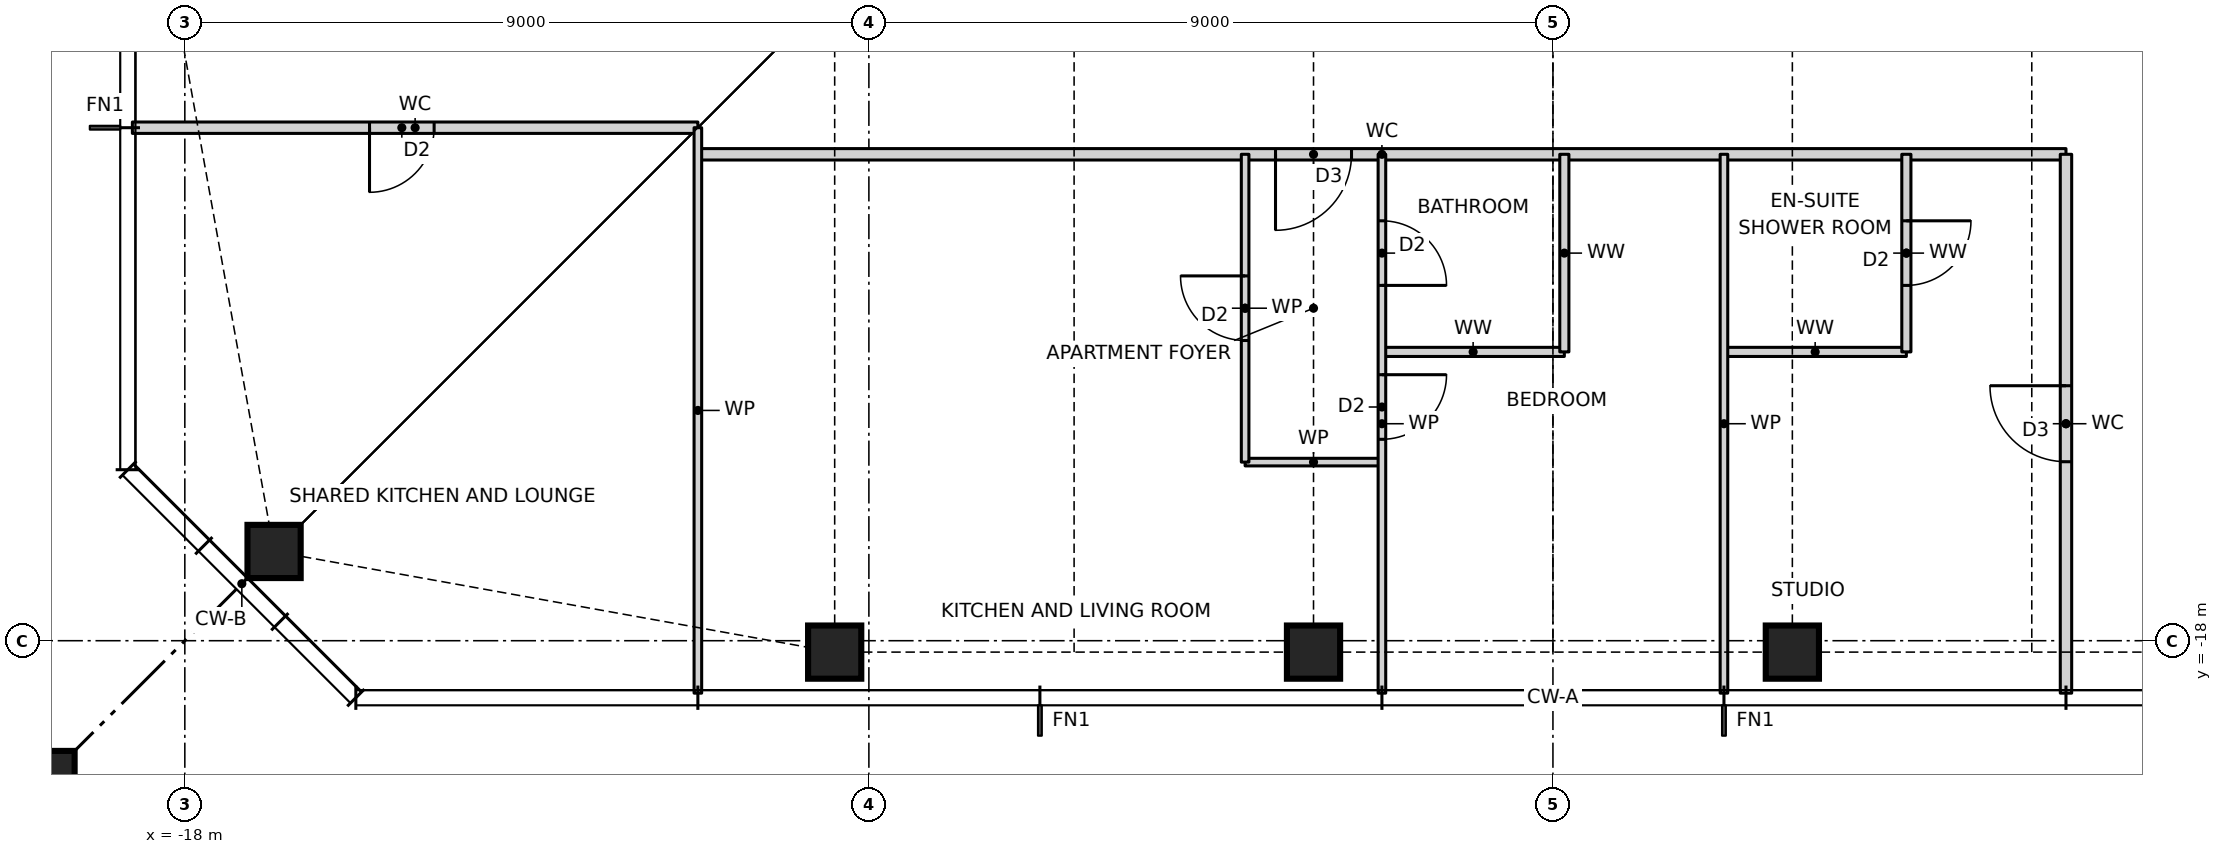
"""IFC4 building model, lengths in metres.
Left out: names, types, materials, properties, quantities, classifications, styles, units other than length and angle.
Written with IfcOpenShell. Run it as: python <this file> out.ifc"""

import sys

from ifc_helpers import new_model, si_unit, direction, frame, frame_2d, origin, origin_2d, place, context, subcontext, project, spatial, rectangle, hollow_rectangle, i_section, extrude, element, fill, save


model = new_model("IFC4")
c1 = context("Model", 3, precision=1e-05, world=origin(), true_north=direction((0.0, 1.0)))
c2 = subcontext(c1, "Body", "Model", "MODEL_VIEW")
j1 = project(units=[si_unit("LENGTHUNIT", "METRE"), si_unit("PLANEANGLEUNIT", "RADIAN")], contexts=[c1])
p1 = place(None, origin())
s1 = spatial("IfcSite", under=j1, at=p1, CompositionType="ELEMENT")
p2 = place(p1, origin())
s2 = spatial("IfcBuilding", under=s1, at=p2, CompositionType="ELEMENT")
p3 = place(p2, frame((0.0, 0.0, 170.5)))
s3 = spatial("IfcBuildingStorey", under=s2, at=p3, CompositionType="ELEMENT", Elevation=170.5)
for number, where, z_axis, x_axis in (
    (1, (-16.826, -16.826, 0.0), (0.0, 0.0, 1.0), (1.0, 0.0, 0.0)),
    (2, (-9.45, -18.15, 0.0), (0.0, 0.0, 1.0), (1.0, 0.0, 0.0)),
    (3, (-3.15, -18.15, 0.0), (0.0, 0.0, 1.0), (1.0, 0.0, 0.0)),
    (4, (3.15, -18.15, 0.0), (0.0, 0.0, 1.0), (1.0, 0.0, 0.0)),
):
    element("IfcColumn", number, at=place(p3, frame(where, z_axis=z_axis, x_axis=x_axis)), inside=s3, PredefinedType="COLUMN", context=c2, shape_type="SweptSolid", body=[
        extrude(hollow_rectangle(XDim=0.7, YDim=0.7, WallThickness=0.06, at=origin_2d()), origin(), (0.0, 0.0, 1.0), 3.5),
    ])
p4 = place(p3, frame((-21.65, -21.65, 0.0), z_axis=(0.0, 0.0, 1.0), x_axis=(1.0, 0.0, 0.0)))
e5 = element("IfcColumn", 5, at=p4, inside=s3, PredefinedType="COLUMN", context=c2, shape_type="SweptSolid", body=[
    extrude(rectangle(XDim=4.4, YDim=4.4, at=origin_2d()), origin(), (0.0, 0.0, 1.0), 3.5),
    extrude(i_section(OverallWidth=0.478, OverallDepth=0.599, WebThickness=0.1, FlangeThickness=0.14, at=origin_2d()), origin(), (0.0, 0.0, 1.0), 3.5),
])
p5 = place(p3, frame((-4.05, -15.65, 0.0), z_axis=(0.0, 0.0, 1.0), x_axis=(1.0, 0.0, 0.0)))
e6 = element("IfcWall", 6, at=p5, inside=s3, PredefinedType="PARTITIONING", context=c2, shape_type="SweptSolid", body=[
    extrude(rectangle(XDim=1.8, YDim=0.1, at=frame_2d((0.9, 0.0))), origin(), (0.0, 0.0, 1.0), 3.27),
])
for number, where, z_axis, x_axis in (
    (7, (-2.25, -14.2, 0.0), (0.0, 0.0, 1.0), (1.0, 0.0, 0.0)),
    (8, (2.25, -14.2, 0.0), (0.0, 0.0, 1.0), (1.0, 0.0, 0.0)),
):
    element("IfcWall", number, at=place(p3, frame(where, z_axis=z_axis, x_axis=x_axis)), inside=s3, PredefinedType="PARTITIONING", context=c2, shape_type="SweptSolid", body=[
        extrude(rectangle(XDim=2.4, YDim=0.12, at=frame_2d((1.2, 0.0))), origin(), (0.0, 0.0, 1.0), 3.27),
    ])
p6 = place(p3, frame((-11.25, -11.6, 0.0), z_axis=(0.0, 0.0, 1.0), x_axis=(1.0, 0.0, 0.0)))
e9 = element("IfcWall", 9, at=p6, inside=s3, PredefinedType="PARTITIONING", context=c2, shape_type="SweptSolid", body=[
    extrude(rectangle(XDim=18.0, YDim=0.15, at=frame_2d((9.0, 0.0))), origin(), (0.0, 0.0, 1.0), 3.27),
])
p7 = place(p6, frame((7.6, 0.0, 0.0)))
e10 = element("IfcOpeningElement", 10, at=p7, cuts=e9, PredefinedType="OPENING", context=c2, shape_type="SweptSolid", body=[
    extrude(rectangle(XDim=1.0, YDim=2.1, at=frame_2d((0.5, 1.05))), frame((0.0, 0.085, 0.0), z_axis=(0.0, -1.0, 0.0), x_axis=(1.0, 0.0, 0.0)), (0.0, 0.0, 1.0), 0.17),
])
p8 = place(p3, frame((-18.69, -11.25, 0.0), z_axis=(0.0, 0.0, 1.0), x_axis=(1.0, 0.0, 0.0)))
e11 = element("IfcWall", 11, at=p8, inside=s3, PredefinedType="PARTITIONING", context=c2, shape_type="SweptSolid", body=[
    extrude(rectangle(XDim=7.44, YDim=0.15, at=frame_2d((3.72, 0.0))), origin(), (0.0, 0.0, 1.0), 3.27),
])
p9 = place(p8, frame((3.12, 0.0, 0.0)))
e12 = element("IfcOpeningElement", 12, at=p9, cuts=e11, PredefinedType="OPENING", context=c2, shape_type="SweptSolid", body=[
    extrude(rectangle(XDim=0.85, YDim=2.1, at=frame_2d((0.425, 1.05))), frame((0.0, 0.085, 0.0), z_axis=(0.0, -1.0, 0.0), x_axis=(1.0, 0.0, 0.0)), (0.0, 0.0, 1.0), 0.17),
])
p10 = place(p3, frame((6.75, -18.69, 0.0), z_axis=(0.0, 0.0, 1.0), x_axis=(0.0, 1.0, 0.0)))
e13 = element("IfcWall", 13, at=p10, inside=s3, PredefinedType="PARTITIONING", context=c2, shape_type="SweptSolid", body=[
    extrude(rectangle(XDim=7.09, YDim=0.15, at=frame_2d((3.545, 0.0))), origin(), (0.0, 0.0, 1.0), 3.27),
])
p11 = place(p10, frame((3.045, 0.0, 0.0)))
e14 = element("IfcOpeningElement", 14, at=p11, cuts=e13, PredefinedType="OPENING", context=c2, shape_type="SweptSolid", body=[
    extrude(rectangle(XDim=1.0, YDim=2.1, at=frame_2d((0.5, 1.05))), frame((0.0, 0.085, 0.0), z_axis=(0.0, -1.0, 0.0), x_axis=(1.0, 0.0, 0.0)), (0.0, 0.0, 1.0), 0.17),
])
p12 = place(p3, frame((4.65, -14.2, 0.0), z_axis=(0.0, 0.0, 1.0), x_axis=(0.0, 1.0, 0.0)))
e15 = element("IfcWall", 15, at=p12, inside=s3, PredefinedType="PARTITIONING", context=c2, shape_type="SweptSolid", body=[
    extrude(rectangle(XDim=2.6, YDim=0.12, at=frame_2d((1.3, 0.0))), origin(), (0.0, 0.0, 1.0), 3.27),
])
p13 = place(p12, frame((0.875, 0.0, 0.0)))
e16 = element("IfcOpeningElement", 16, at=p13, cuts=e15, PredefinedType="OPENING", context=c2, shape_type="SweptSolid", body=[
    extrude(rectangle(XDim=0.85, YDim=2.1, at=frame_2d((0.425, 1.05))), frame((0.0, 0.07, 0.0), z_axis=(0.0, -1.0, 0.0), x_axis=(1.0, 0.0, 0.0)), (0.0, 0.0, 1.0), 0.14),
])
p14 = place(p3, frame((2.25, -18.69, 0.0), z_axis=(0.0, 0.0, 1.0), x_axis=(0.0, 1.0, 0.0)))
e17 = element("IfcWall", 17, at=p14, inside=s3, PredefinedType="PARTITIONING", context=c2, shape_type="SweptSolid", body=[
    extrude(rectangle(XDim=7.09, YDim=0.1, at=frame_2d((3.545, 0.0))), origin(), (0.0, 0.0, 1.0), 3.27),
])
p15 = place(p3, frame((0.15, -14.2, 0.0), z_axis=(0.0, 0.0, 1.0), x_axis=(0.0, 1.0, 0.0)))
e18 = element("IfcWall", 18, at=p15, inside=s3, PredefinedType="PARTITIONING", context=c2, shape_type="SweptSolid", body=[
    extrude(rectangle(XDim=2.6, YDim=0.12, at=frame_2d((1.3, 0.0))), origin(), (0.0, 0.0, 1.0), 3.27),
])
p16 = place(p3, frame((-2.25, -18.69, 0.0), z_axis=(0.0, 0.0, 1.0), x_axis=(0.0, 1.0, 0.0)))
e19 = element("IfcWall", 19, at=p16, inside=s3, PredefinedType="PARTITIONING", context=c2, shape_type="SweptSolid", body=[
    extrude(rectangle(XDim=7.09, YDim=0.1, at=frame_2d((3.545, 0.0))), origin(), (0.0, 0.0, 1.0), 3.27),
])
p17 = place(p16, frame((3.34, 0.0, 0.0)))
e20 = element("IfcOpeningElement", 20, at=p17, cuts=e19, PredefinedType="OPENING", context=c2, shape_type="SweptSolid", body=[
    extrude(rectangle(XDim=0.85, YDim=2.1, at=frame_2d((0.425, 1.05))), frame((0.0, 0.06, 0.0), z_axis=(0.0, -1.0, 0.0), x_axis=(1.0, 0.0, 0.0)), (0.0, 0.0, 1.0), 0.12),
])
p18 = place(p16, frame((5.365, 0.0, 0.0)))
e21 = element("IfcOpeningElement", 21, at=p18, cuts=e19, PredefinedType="OPENING", context=c2, shape_type="SweptSolid", body=[
    extrude(rectangle(XDim=0.85, YDim=2.1, at=frame_2d((0.425, 1.05))), frame((0.0, 0.06, 0.0), z_axis=(0.0, -1.0, 0.0), x_axis=(1.0, 0.0, 0.0)), (0.0, 0.0, 1.0), 0.12),
])
p19 = place(p3, frame((-4.05, -15.65, 0.0), z_axis=(0.0, 0.0, 1.0), x_axis=(0.0, 1.0, 0.0)))
e22 = element("IfcWall", 22, at=p19, inside=s3, PredefinedType="PARTITIONING", context=c2, shape_type="SweptSolid", body=[
    extrude(rectangle(XDim=4.05, YDim=0.1, at=frame_2d((2.025, 0.0))), origin(), (0.0, 0.0, 1.0), 3.27),
])
p20 = place(p19, frame((1.6, 0.0, 0.0)))
e23 = element("IfcOpeningElement", 23, at=p20, cuts=e22, PredefinedType="OPENING", context=c2, shape_type="SweptSolid", body=[
    extrude(rectangle(XDim=0.85, YDim=2.1, at=frame_2d((0.425, 1.05))), frame((0.0, 0.06, 0.0), z_axis=(0.0, -1.0, 0.0), x_axis=(1.0, 0.0, 0.0)), (0.0, 0.0, 1.0), 0.12),
])
p21 = place(p3, frame((-11.25, -18.69, 0.0), z_axis=(0.0, 0.0, 1.0), x_axis=(0.0, 1.0, 0.0)))
e24 = element("IfcWall", 24, at=p21, inside=s3, PredefinedType="PARTITIONING", context=c2, shape_type="SweptSolid", body=[
    extrude(rectangle(XDim=7.44, YDim=0.1, at=frame_2d((3.72, 0.0))), origin(), (0.0, 0.0, 1.0), 3.27),
])
p22 = place(p7, frame((1.0, 0.0, 0.0), z_axis=(0.0, 0.0, 1.0), x_axis=(-1.0, 0.0, 0.0)))
e25 = element("IfcDoor", 25, at=p22, inside=s3, OperationType="SINGLE_SWING_RIGHT", PredefinedType="DOOR", context=c2, shape_type="SweptSolid", body=[
    extrude(rectangle(XDim=1.0, YDim=2.1, at=frame_2d((0.5, 1.05))), frame((0.0, 0.025, 0.0), z_axis=(0.0, -1.0, 0.0), x_axis=(1.0, 0.0, 0.0)), (0.0, 0.0, 1.0), 0.05),
])
fill(e10, e25)
p23 = place(p20, origin())
e26 = element("IfcDoor", 26, at=p23, inside=s3, OperationType="SINGLE_SWING_RIGHT", PredefinedType="DOOR", context=c2, shape_type="SweptSolid", body=[
    extrude(rectangle(XDim=0.85, YDim=2.1, at=frame_2d((0.425, 1.05))), frame((0.0, 0.025, 0.0), z_axis=(0.0, -1.0, 0.0), x_axis=(1.0, 0.0, 0.0)), (0.0, 0.0, 1.0), 0.05),
])
fill(e23, e26)
p24 = place(p17, frame((0.85, 0.0, 0.0), z_axis=(0.0, 0.0, 1.0), x_axis=(-1.0, 0.0, 0.0)))
e27 = element("IfcDoor", 27, at=p24, inside=s3, OperationType="SINGLE_SWING_LEFT", PredefinedType="DOOR", context=c2, shape_type="SweptSolid", body=[
    extrude(rectangle(XDim=0.85, YDim=2.1, at=frame_2d((0.425, 1.05))), frame((0.0, 0.025, 0.0), z_axis=(0.0, -1.0, 0.0), x_axis=(1.0, 0.0, 0.0)), (0.0, 0.0, 1.0), 0.05),
])
fill(e20, e27)
p25 = place(p18, frame((0.85, 0.0, 0.0), z_axis=(0.0, 0.0, 1.0), x_axis=(-1.0, 0.0, 0.0)))
e28 = element("IfcDoor", 28, at=p25, inside=s3, OperationType="SINGLE_SWING_RIGHT", PredefinedType="DOOR", context=c2, shape_type="SweptSolid", body=[
    extrude(rectangle(XDim=0.85, YDim=2.1, at=frame_2d((0.425, 1.05))), frame((0.0, 0.025, 0.0), z_axis=(0.0, -1.0, 0.0), x_axis=(1.0, 0.0, 0.0)), (0.0, 0.0, 1.0), 0.05),
])
fill(e21, e28)
p26 = place(p11, origin())
e29 = element("IfcDoor", 29, at=p26, inside=s3, OperationType="SINGLE_SWING_RIGHT", PredefinedType="DOOR", context=c2, shape_type="SweptSolid", body=[
    extrude(rectangle(XDim=1.0, YDim=2.1, at=frame_2d((0.5, 1.05))), frame((0.0, 0.025, 0.0), z_axis=(0.0, -1.0, 0.0), x_axis=(1.0, 0.0, 0.0)), (0.0, 0.0, 1.0), 0.05),
])
fill(e14, e29)
p27 = place(p13, frame((0.85, 0.0, 0.0), z_axis=(0.0, 0.0, 1.0), x_axis=(-1.0, 0.0, 0.0)))
e30 = element("IfcDoor", 30, at=p27, inside=s3, OperationType="SINGLE_SWING_LEFT", PredefinedType="DOOR", context=c2, shape_type="SweptSolid", body=[
    extrude(rectangle(XDim=0.85, YDim=2.1, at=frame_2d((0.425, 1.05))), frame((0.0, 0.025, 0.0), z_axis=(0.0, -1.0, 0.0), x_axis=(1.0, 0.0, 0.0)), (0.0, 0.0, 1.0), 0.05),
])
fill(e16, e30)
p28 = place(p9, frame((0.85, 0.0, 0.0), z_axis=(0.0, 0.0, 1.0), x_axis=(-1.0, 0.0, 0.0)))
e31 = element("IfcDoor", 31, at=p28, inside=s3, OperationType="SINGLE_SWING_RIGHT", PredefinedType="DOOR", context=c2, shape_type="SweptSolid", body=[
    extrude(rectangle(XDim=0.85, YDim=2.1, at=frame_2d((0.425, 1.05))), frame((0.0, 0.025, 0.0), z_axis=(0.0, -1.0, 0.0), x_axis=(1.0, 0.0, 0.0)), (0.0, 0.0, 1.0), 0.05),
])
fill(e12, e31)
save(model, sys.argv[1])
